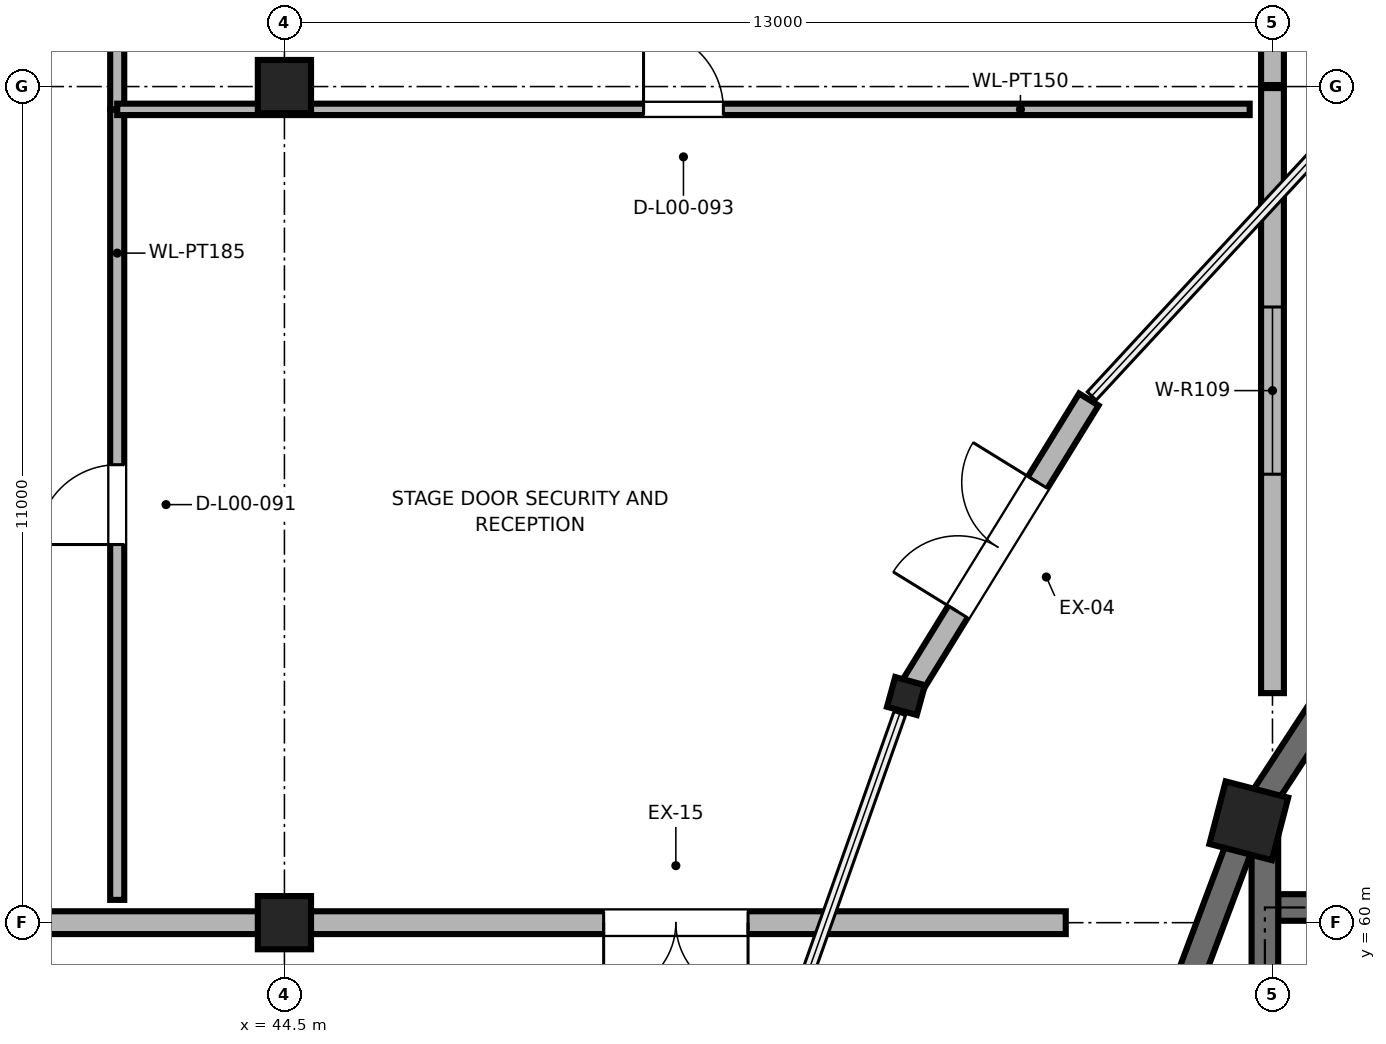
"""IFC4 building model, lengths in metres.
Left out: names, types, materials, properties, quantities, classifications, styles, units other than length and angle.
Written with IfcOpenShell. Run it as: python <this file> out.ifc"""

import sys

from ifc_helpers import new_model, si_unit, direction, frame, frame_2d, origin, origin_2d, place, context, subcontext, project, spatial, rectangle, hollow_circle, extrude, element, fill, save


model = new_model("IFC4")
c1 = context("Model", 3, precision=1e-05, world=origin(), true_north=direction((0.0, 1.0)))
c2 = subcontext(c1, "Body", "Model", "MODEL_VIEW")
j1 = project(units=[si_unit("LENGTHUNIT", "METRE"), si_unit("PLANEANGLEUNIT", "RADIAN")], contexts=[c1])
p1 = place(None, origin())
s1 = spatial("IfcSite", under=j1, at=p1, CompositionType="ELEMENT")
p2 = place(p1, origin())
s2 = spatial("IfcBuilding", under=s1, at=p2, CompositionType="ELEMENT")
p3 = place(p2, origin())
s3 = spatial("IfcBuildingStorey", under=s2, at=p3, CompositionType="ELEMENT", Elevation=0.0)
p4 = place(p3, frame((52.678, 62.982, 0.0), z_axis=(0.0, 0.0, 1.0), x_axis=(-0.964141737836, 0.265387847052, 0.0)))
e1 = element("IfcColumn", 1, at=p4, inside=s3, PredefinedType="COLUMN", context=c2, shape_type="SweptSolid", body=[
    extrude(hollow_circle(Radius=0.203, WallThickness=0.025, at=origin_2d()), origin(), (0.0, 0.0, 1.0), 4.8),
])
p5 = place(p3, frame((57.189, 61.34, 0.0), z_axis=(0.0, 0.0, 1.0), x_axis=(-0.967841021032, 0.251562632376, 0.0)))
e2 = element("IfcColumn", 2, at=p5, inside=s3, PredefinedType="COLUMN", context=c2, shape_type="SweptSolid", body=[
    extrude(rectangle(XDim=0.85, YDim=0.85, at=origin_2d()), origin(), (0.0, 0.0, 1.0), 4.8),
])
for number, where, z_axis, x_axis in (
    (3, (44.5, 60.0, 0.0), (0.0, 0.0, 1.0), (1.0, 0.0, 0.0)),
    (4, (44.5, 71.0, 0.0), (0.0, 0.0, 1.0), (1.0, 0.0, 0.0)),
):
    element("IfcColumn", number, at=place(p3, frame(where, z_axis=z_axis, x_axis=x_axis)), inside=s3, PredefinedType="COLUMN", context=c2, shape_type="SweptSolid", body=[
        extrude(rectangle(XDim=0.7, YDim=0.7, at=origin_2d()), origin(), (0.0, 0.0, 1.0), 4.8),
    ])
p6 = place(p3, frame((59.251, 64.5, 0.0), z_axis=(0.0, 0.0, 1.0), x_axis=(-0.546611158382, -0.837386554425, 0.0)))
e5 = element("IfcWall", 5, at=p6, inside=s3, PredefinedType="SHEAR", context=c2, shape_type="SweptSolid", body=[
    extrude(rectangle(XDim=3.773, YDim=0.35, at=frame_2d((1.887, 0.0))), origin(), (0.0, 0.0, 1.0), 4.52),
])
p7 = place(p3, frame((57.189, 61.34, 0.0), z_axis=(0.0, 0.0, 1.0), x_axis=(-0.351279653979, -0.936270583058, 0.0)))
e6 = element("IfcWall", 6, at=p7, inside=s3, PredefinedType="SHEAR", context=c2, shape_type="SweptSolid", body=[
    extrude(rectangle(XDim=3.597, YDim=0.35, at=frame_2d((1.798, 0.0))), origin(), (0.0, 0.0, 1.0), 4.52),
])
p8 = place(p3, frame((52.689, 62.999, 0.0), z_axis=(0.0, 0.0, 1.0), x_axis=(0.524906145614, 0.851160113197, 0.0)))
e7 = element("IfcWall", 7, at=p8, inside=s3, PredefinedType="SOLIDWALL", context=c2, shape_type="SweptSolid", body=[
    extrude(rectangle(XDim=4.563, YDim=0.3, at=frame_2d((2.282, 0.0))), origin(), (0.0, 0.0, 1.0), 3.958),
])
p9 = place(p8, frame((1.281, 0.0, 0.0)))
e8 = element("IfcOpeningElement", 8, at=p9, cuts=e7, PredefinedType="OPENING", context=c2, shape_type="SweptSolid", body=[
    extrude(rectangle(XDim=2.0, YDim=2.3, at=frame_2d((1.0, 1.15))), frame((0.0, 0.16, 0.0), z_axis=(0.0, -1.0, 0.0), x_axis=(1.0, 0.0, 0.0)), (0.0, 0.0, 1.0), 0.32),
])
p10 = place(p3, frame((44.48, 60.0, 0.0), z_axis=(0.0, 0.0, 1.0), x_axis=(-1.0, 0.0, 0.0)))
e9 = element("IfcWall", 9, at=p10, inside=s3, PredefinedType="SOLIDWALL", context=c2, shape_type="SweptSolid", body=[
    extrude(rectangle(XDim=12.96, YDim=0.3, at=frame_2d((6.48, 0.0))), origin(), (0.0, 0.0, 1.0), 3.958),
])
p11 = place(p10, frame((5.58, 0.0, 1.5)))
e10 = element("IfcOpeningElement", 10, at=p11, cuts=e9, PredefinedType="OPENING", context=c2, shape_type="SweptSolid", body=[
    extrude(rectangle(XDim=1.8, YDim=1.05, at=frame_2d((0.9, 0.525))), frame((0.0, 0.16, 0.0), z_axis=(0.0, -1.0, 0.0), x_axis=(1.0, 0.0, 0.0)), (0.0, 0.0, 1.0), 0.32),
])
p12 = place(p3, frame((54.78, 60.0, 0.0), z_axis=(0.0, 0.0, 1.0), x_axis=(-1.0, 0.0, 0.0)))
e11 = element("IfcWall", 11, at=p12, inside=s3, PredefinedType="SOLIDWALL", context=c2, shape_type="SweptSolid", body=[
    extrude(rectangle(XDim=10.26, YDim=0.3, at=frame_2d((5.13, 0.0))), origin(), (0.0, 0.0, 1.0), 3.958),
])
p13 = place(p12, frame((4.18, 0.0, 0.0)))
e12 = element("IfcOpeningElement", 12, at=p13, cuts=e11, PredefinedType="OPENING", context=c2, shape_type="SweptSolid", body=[
    extrude(rectangle(XDim=1.9, YDim=2.3, at=frame_2d((0.95, 1.15))), frame((0.0, 0.16, 0.0), z_axis=(0.0, -1.0, 0.0), x_axis=(1.0, 0.0, 0.0)), (0.0, 0.0, 1.0), 0.32),
])
p14 = place(p3, frame((57.5, 70.98, 0.0), z_axis=(0.0, 0.0, 1.0), x_axis=(0.0, -1.0, 0.0)))
e13 = element("IfcWall", 13, at=p14, inside=s3, PredefinedType="SOLIDWALL", context=c2, shape_type="SweptSolid", body=[
    extrude(rectangle(XDim=7.96, YDim=0.3, at=frame_2d((3.98, 0.0))), origin(), (0.0, 0.0, 1.0), 3.958),
])
p15 = place(p14, frame((2.88, 0.0, 1.5)))
e14 = element("IfcOpeningElement", 14, at=p15, cuts=e13, PredefinedType="OPENING", context=c2, shape_type="SweptSolid", body=[
    extrude(rectangle(XDim=2.2, YDim=1.05, at=frame_2d((1.1, 0.525))), frame((0.0, 0.16, 0.0), z_axis=(0.0, -1.0, 0.0), x_axis=(1.0, 0.0, 0.0)), (0.0, 0.0, 1.0), 0.32),
])
p16 = place(p3, frame((57.5, 81.98, 0.0), z_axis=(0.0, 0.0, 1.0), x_axis=(0.0, -1.0, 0.0)))
e15 = element("IfcWall", 15, at=p16, inside=s3, PredefinedType="SOLIDWALL", context=c2, shape_type="SweptSolid", body=[
    extrude(rectangle(XDim=10.96, YDim=0.3, at=frame_2d((5.48, 0.0))), origin(), (0.0, 0.0, 1.0), 3.958),
])
p17 = place(p16, frame((4.18, 0.0, 1.5)))
e16 = element("IfcOpeningElement", 16, at=p17, cuts=e15, PredefinedType="OPENING", context=c2, shape_type="SweptSolid", body=[
    extrude(rectangle(XDim=2.6, YDim=1.05, at=frame_2d((1.3, 0.525))), frame((0.0, 0.16, 0.0), z_axis=(0.0, -1.0, 0.0), x_axis=(1.0, 0.0, 0.0)), (0.0, 0.0, 1.0), 0.32),
])
p18 = place(p3, frame((57.575, 60.2, 0.0), z_axis=(0.0, 0.0, 1.0), x_axis=(1.0, 0.0, 0.0)))
e17 = element("IfcWall", 17, at=p18, inside=s3, PredefinedType="SHEAR", context=c2, shape_type="SweptSolid", body=[
    extrude(rectangle(XDim=6.45, YDim=0.35, at=frame_2d((3.225, 0.0))), origin(), (0.0, 0.0, 1.0), 4.52),
])
p19 = place(p18, frame((1.15, 0.0, 0.0)))
e18 = element("IfcOpeningElement", 18, at=p19, cuts=e17, PredefinedType="OPENING", context=c2, shape_type="SweptSolid", body=[
    extrude(rectangle(XDim=1.35, YDim=2.2, at=frame_2d((0.675, 1.1))), frame((0.0, 0.185, 0.0), z_axis=(0.0, -1.0, 0.0), x_axis=(1.0, 0.0, 0.0)), (0.0, 0.0, 1.0), 0.37),
])
p20 = place(p18, frame((5.28, 0.0, 0.0)))
e19 = element("IfcOpeningElement", 19, at=p20, cuts=e17, PredefinedType="OPENING", context=c2, shape_type="SweptSolid", body=[
    extrude(rectangle(XDim=0.95, YDim=2.12, at=frame_2d((0.475, 1.06))), frame((0.0, 0.185, 0.0), z_axis=(0.0, -1.0, 0.0), x_axis=(1.0, 0.0, 0.0)), (0.0, 0.0, 1.0), 0.37),
])
p21 = place(p3, frame((57.4, 48.775, 0.0), z_axis=(0.0, 0.0, 1.0), x_axis=(0.0, 1.0, 0.0)))
e20 = element("IfcWall", 20, at=p21, inside=s3, PredefinedType="SHEAR", context=c2, shape_type="SweptSolid", body=[
    extrude(rectangle(XDim=12.565, YDim=0.35, at=frame_2d((6.283, 0.0))), origin(), (0.0, 0.0, 1.0), 4.52),
])
p22 = place(p3, frame((42.3, 60.3, 0.0), z_axis=(0.0, 0.0, 1.0), x_axis=(0.0, 1.0, 0.0)))
e21 = element("IfcWall", 21, at=p22, inside=s3, PredefinedType="PARTITIONING", context=c2, shape_type="SweptSolid", body=[
    extrude(rectangle(XDim=10.4, YDim=0.185, at=frame_2d((5.2, 0.0))), origin(), (0.0, 0.0, 1.0), 3.96),
])
p23 = place(p22, frame((4.675, 0.0, 0.0)))
e22 = element("IfcOpeningElement", 22, at=p23, cuts=e21, PredefinedType="OPENING", context=c2, shape_type="SweptSolid", body=[
    extrude(rectangle(XDim=1.05, YDim=2.15, at=frame_2d((0.525, 1.075))), frame((0.0, 0.103, 0.0), z_axis=(0.0, -1.0, 0.0), x_axis=(1.0, 0.0, 0.0)), (0.0, 0.0, 1.0), 0.205),
])
p24 = place(p3, frame((42.3, 70.7, 0.0), z_axis=(0.0, 0.0, 1.0), x_axis=(0.0, 1.0, 0.0)))
e23 = element("IfcWall", 23, at=p24, inside=s3, PredefinedType="PARTITIONING", context=c2, shape_type="SweptSolid", body=[
    extrude(rectangle(XDim=10.5, YDim=0.185, at=frame_2d((5.25, 0.0))), origin(), (0.0, 0.0, 1.0), 4.514),
])
p25 = place(p24, frame((4.725, 0.0, 0.0)))
e24 = element("IfcOpeningElement", 24, at=p25, cuts=e23, PredefinedType="OPENING", context=c2, shape_type="SweptSolid", body=[
    extrude(rectangle(XDim=1.05, YDim=2.15, at=frame_2d((0.525, 1.075))), frame((0.0, 0.103, 0.0), z_axis=(0.0, -1.0, 0.0), x_axis=(1.0, 0.0, 0.0)), (0.0, 0.0, 1.0), 0.205),
])
p26 = place(p3, frame((42.3, 70.7, 0.0), z_axis=(0.0, 0.0, 1.0), x_axis=(1.0, 0.0, 0.0)))
e25 = element("IfcWall", 25, at=p26, inside=s3, PredefinedType="PARTITIONING", context=c2, shape_type="SweptSolid", body=[
    extrude(rectangle(XDim=14.9, YDim=0.15, at=frame_2d((7.45, 0.0))), origin(), (0.0, 0.0, 1.0), 3.96),
])
p27 = place(p26, frame((6.925, 0.0, 0.0)))
e26 = element("IfcOpeningElement", 26, at=p27, cuts=e25, PredefinedType="OPENING", context=c2, shape_type="SweptSolid", body=[
    extrude(rectangle(XDim=1.05, YDim=2.15, at=frame_2d((0.525, 1.075))), frame((0.0, 0.085, 0.0), z_axis=(0.0, -1.0, 0.0), x_axis=(1.0, 0.0, 0.0)), (0.0, 0.0, 1.0), 0.17),
])
p28 = place(p9, origin())
e27 = element("IfcDoor", 27, at=p28, inside=s3, OperationType="DOUBLE_DOOR_SINGLE_SWING", PredefinedType="DOOR", context=c2, shape_type="SweptSolid", body=[
    extrude(rectangle(XDim=2.0, YDim=2.3, at=frame_2d((1.0, 1.15))), frame((0.0, 0.025, 0.0), z_axis=(0.0, -1.0, 0.0), x_axis=(1.0, 0.0, 0.0)), (0.0, 0.0, 1.0), 0.05),
])
fill(e8, e27)
p29 = place(p13, origin())
e28 = element("IfcDoor", 28, at=p29, inside=s3, OperationType="DOUBLE_DOOR_SINGLE_SWING", PredefinedType="DOOR", context=c2, shape_type="SweptSolid", body=[
    extrude(rectangle(XDim=1.9, YDim=2.3, at=frame_2d((0.95, 1.15))), frame((0.0, 0.025, 0.0), z_axis=(0.0, -1.0, 0.0), x_axis=(1.0, 0.0, 0.0)), (0.0, 0.0, 1.0), 0.05),
])
fill(e12, e28)
p30 = place(p15, origin())
e29 = element("IfcWindow", 29, at=p30, inside=s3, PartitioningType="SINGLE_PANEL", PredefinedType="WINDOW", context=c2, shape_type="SweptSolid", body=[
    extrude(rectangle(XDim=2.2, YDim=1.05, at=frame_2d((1.1, 0.525))), frame((0.0, 0.03, 0.0), z_axis=(0.0, -1.0, 0.0), x_axis=(1.0, 0.0, 0.0)), (0.0, 0.0, 1.0), 0.06),
])
fill(e14, e29)
p31 = place(p23, origin())
e30 = element("IfcDoor", 30, at=p31, inside=s3, OperationType="SINGLE_SWING_LEFT", PredefinedType="DOOR", context=c2, shape_type="SweptSolid", body=[
    extrude(rectangle(XDim=1.05, YDim=2.15, at=frame_2d((0.525, 1.075))), frame((0.0, 0.025, 0.0), z_axis=(0.0, -1.0, 0.0), x_axis=(1.0, 0.0, 0.0)), (0.0, 0.0, 1.0), 0.05),
])
fill(e22, e30)
p32 = place(p27, origin())
e31 = element("IfcDoor", 31, at=p32, inside=s3, OperationType="SINGLE_SWING_LEFT", PredefinedType="DOOR", context=c2, shape_type="SweptSolid", body=[
    extrude(rectangle(XDim=1.05, YDim=2.15, at=frame_2d((0.525, 1.075))), frame((0.0, 0.025, 0.0), z_axis=(0.0, -1.0, 0.0), x_axis=(1.0, 0.0, 0.0)), (0.0, 0.0, 1.0), 0.05),
])
fill(e26, e31)
save(model, sys.argv[1])
